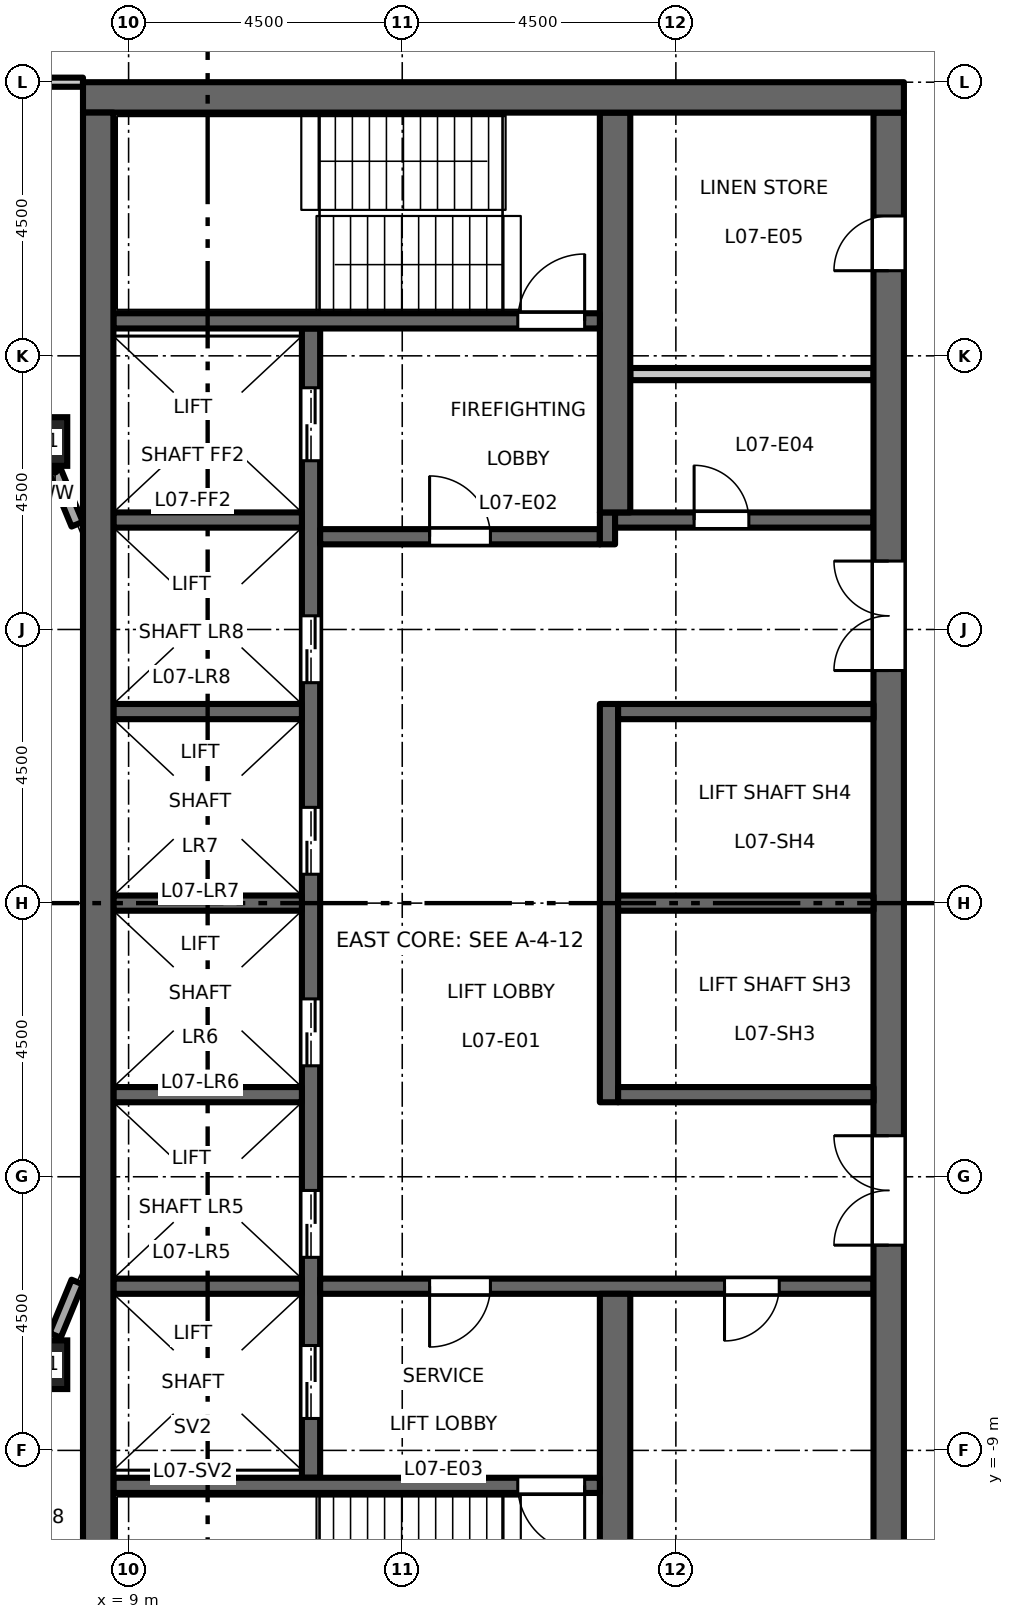
"""IFC4 building model, lengths in metres.
Left out: names, types, materials, properties, quantities, classifications, styles, units other than length and angle.
Written with IfcOpenShell. Run it as: python <this file> out.ifc"""

import sys

from ifc_helpers import new_model, si_unit, direction, frame, frame_2d, origin, origin_2d, place, context, subcontext, project, spatial, rectangle, hollow_rectangle, extrude, element, fill, save


model = new_model("IFC4")
c1 = context("Model", 3, precision=1e-05, world=origin(), true_north=direction((0.0, 1.0)))
c2 = subcontext(c1, "Body", "Model", "MODEL_VIEW")
j1 = project(units=[si_unit("LENGTHUNIT", "METRE"), si_unit("PLANEANGLEUNIT", "RADIAN")], contexts=[c1])
p1 = place(None, origin())
s1 = spatial("IfcSite", under=j1, at=p1, CompositionType="ELEMENT")
p2 = place(p1, origin())
s2 = spatial("IfcBuilding", under=s1, at=p2, CompositionType="ELEMENT")
p3 = place(p2, frame((0.0, 0.0, 35.7)))
s3 = spatial("IfcBuildingStorey", under=s2, at=p3, CompositionType="ELEMENT", Elevation=35.7)
for number, where, z_axis, x_axis in (
    (1, (7.591, -7.591, 0.0), (0.0, 0.0, 1.0), (1.0, 0.0, 0.0)),
    (2, (7.591, 7.591, 0.0), (0.0, 0.0, 1.0), (1.0, 0.0, 0.0)),
):
    element("IfcColumn", number, at=place(p3, frame(where, z_axis=z_axis, x_axis=x_axis)), inside=s3, PredefinedType="COLUMN", context=c2, shape_type="SweptSolid", body=[
        extrude(hollow_rectangle(XDim=0.8, YDim=0.8, WallThickness=0.05, at=origin_2d()), origin(), (0.0, 0.0, 1.0), 4.5),
    ])
p4 = place(p3, frame((12.0, -9.45, 0.0), z_axis=(0.0, 0.0, 1.0), x_axis=(0.0, 1.0, 0.0)))
e3 = element("IfcWall", 3, at=p4, inside=s3, PredefinedType="SHEAR", context=c2, shape_type="SweptSolid", body=[
    extrude(rectangle(XDim=18.9, YDim=0.3, at=frame_2d((9.45, 0.0))), origin(), (0.0, 0.0, 1.0), 4.35),
])
p5 = place(p4, frame((3.625, 0.0, 0.0)))
e4 = element("IfcOpeningElement", 4, at=p5, cuts=e3, PredefinedType="OPENING", context=c2, shape_type="SweptSolid", body=[
    extrude(rectangle(XDim=1.1, YDim=2.1, at=frame_2d((0.55, 1.05))), frame((0.0, 0.16, 0.0), z_axis=(0.0, -1.0, 0.0), x_axis=(1.0, 0.0, 0.0)), (0.0, 0.0, 1.0), 0.32),
])
p6 = place(p4, frame((6.775, 0.0, 0.0)))
e5 = element("IfcOpeningElement", 5, at=p6, cuts=e3, PredefinedType="OPENING", context=c2, shape_type="SweptSolid", body=[
    extrude(rectangle(XDim=1.1, YDim=2.1, at=frame_2d((0.55, 1.05))), frame((0.0, 0.16, 0.0), z_axis=(0.0, -1.0, 0.0), x_axis=(1.0, 0.0, 0.0)), (0.0, 0.0, 1.0), 0.32),
])
p7 = place(p4, frame((9.925, 0.0, 0.0)))
e6 = element("IfcOpeningElement", 6, at=p7, cuts=e3, PredefinedType="OPENING", context=c2, shape_type="SweptSolid", body=[
    extrude(rectangle(XDim=1.1, YDim=2.1, at=frame_2d((0.55, 1.05))), frame((0.0, 0.16, 0.0), z_axis=(0.0, -1.0, 0.0), x_axis=(1.0, 0.0, 0.0)), (0.0, 0.0, 1.0), 0.32),
])
p8 = place(p4, frame((13.075, 0.0, 0.0)))
e7 = element("IfcOpeningElement", 7, at=p8, cuts=e3, PredefinedType="OPENING", context=c2, shape_type="SweptSolid", body=[
    extrude(rectangle(XDim=1.1, YDim=2.1, at=frame_2d((0.55, 1.05))), frame((0.0, 0.16, 0.0), z_axis=(0.0, -1.0, 0.0), x_axis=(1.0, 0.0, 0.0)), (0.0, 0.0, 1.0), 0.32),
])
p9 = place(p4, frame((16.725, 0.0, 0.0)))
e8 = element("IfcOpeningElement", 8, at=p9, cuts=e3, PredefinedType="OPENING", context=c2, shape_type="SweptSolid", body=[
    extrude(rectangle(XDim=1.2, YDim=2.1, at=frame_2d((0.6, 1.05))), frame((0.0, 0.16, 0.0), z_axis=(0.0, -1.0, 0.0), x_axis=(1.0, 0.0, 0.0)), (0.0, 0.0, 1.0), 0.32),
])
p10 = place(p4, frame((0.975, 0.0, 0.0)))
e9 = element("IfcOpeningElement", 9, at=p10, cuts=e3, PredefinedType="OPENING", context=c2, shape_type="SweptSolid", body=[
    extrude(rectangle(XDim=1.2, YDim=2.1, at=frame_2d((0.6, 1.05))), frame((0.0, 0.16, 0.0), z_axis=(0.0, -1.0, 0.0), x_axis=(1.0, 0.0, 0.0)), (0.0, 0.0, 1.0), 0.32),
])
p11 = place(p3, frame((12.15, 6.025, 0.0), z_axis=(0.0, 0.0, 1.0), x_axis=(1.0, 0.0, 0.0)))
e10 = element("IfcWall", 10, at=p11, inside=s3, PredefinedType="SHEAR", context=c2, shape_type="SweptSolid", body=[
    extrude(rectangle(XDim=4.6, YDim=0.25, at=frame_2d((2.3, 0.0))), origin(), (0.0, 0.0, 1.0), 4.35),
])
p12 = place(p11, frame((1.8, 0.0, 0.0)))
e11 = element("IfcOpeningElement", 11, at=p12, cuts=e10, PredefinedType="OPENING", context=c2, shape_type="SweptSolid", body=[
    extrude(rectangle(XDim=1.0, YDim=2.1, at=frame_2d((0.5, 1.05))), frame((0.0, 0.135, 0.0), z_axis=(0.0, -1.0, 0.0), x_axis=(1.0, 0.0, 0.0)), (0.0, 0.0, 1.0), 0.27),
])
p13 = place(p3, frame((16.875, 5.9, 0.0), z_axis=(0.0, 0.0, 1.0), x_axis=(0.0, 1.0, 0.0)))
e12 = element("IfcWall", 12, at=p13, inside=s3, PredefinedType="SHEAR", context=c2, shape_type="SweptSolid", body=[
    extrude(rectangle(XDim=0.525, YDim=0.25, at=frame_2d((0.263, 0.0))), origin(), (0.0, 0.0, 1.0), 4.35),
])
p14 = place(p3, frame((17.0, 6.3, 0.0), z_axis=(0.0, 0.0, 1.0), x_axis=(1.0, 0.0, 0.0)))
e13 = element("IfcWall", 13, at=p14, inside=s3, PredefinedType="SHEAR", context=c2, shape_type="SweptSolid", body=[
    extrude(rectangle(XDim=4.25, YDim=0.25, at=frame_2d((2.125, 0.0))), origin(), (0.0, 0.0, 1.0), 4.35),
])
p15 = place(p14, frame((1.3, 0.0, 0.0)))
e14 = element("IfcOpeningElement", 14, at=p15, cuts=e13, PredefinedType="OPENING", context=c2, shape_type="SweptSolid", body=[
    extrude(rectangle(XDim=0.9, YDim=2.1, at=frame_2d((0.45, 1.05))), frame((0.0, 0.135, 0.0), z_axis=(0.0, -1.0, 0.0), x_axis=(1.0, 0.0, 0.0)), (0.0, 0.0, 1.0), 0.27),
])
p16 = place(p3, frame((12.15, -6.3, 0.0), z_axis=(0.0, 0.0, 1.0), x_axis=(1.0, 0.0, 0.0)))
e15 = element("IfcWall", 15, at=p16, inside=s3, PredefinedType="SHEAR", context=c2, shape_type="SweptSolid", body=[
    extrude(rectangle(XDim=9.1, YDim=0.25, at=frame_2d((4.55, 0.0))), origin(), (0.0, 0.0, 1.0), 4.35),
])
p17 = place(p16, frame((1.8, 0.0, 0.0)))
e16 = element("IfcOpeningElement", 16, at=p17, cuts=e15, PredefinedType="OPENING", context=c2, shape_type="SweptSolid", body=[
    extrude(rectangle(XDim=1.0, YDim=2.1, at=frame_2d((0.5, 1.05))), frame((0.0, 0.135, 0.0), z_axis=(0.0, -1.0, 0.0), x_axis=(1.0, 0.0, 0.0)), (0.0, 0.0, 1.0), 0.27),
])
p18 = place(p16, frame((6.65, 0.0, 0.0)))
e17 = element("IfcOpeningElement", 17, at=p18, cuts=e15, PredefinedType="OPENING", context=c2, shape_type="SweptSolid", body=[
    extrude(rectangle(XDim=0.9, YDim=2.1, at=frame_2d((0.45, 1.05))), frame((0.0, 0.135, 0.0), z_axis=(0.0, -1.0, 0.0), x_axis=(1.0, 0.0, 0.0)), (0.0, 0.0, 1.0), 0.27),
])
p19 = place(p3, frame((21.5, -13.0, 0.0), z_axis=(0.0, 0.0, 1.0), x_axis=(0.0, 1.0, 0.0)))
e18 = element("IfcWall", 18, at=p19, inside=s3, PredefinedType="SHEAR", context=c2, shape_type="SweptSolid", body=[
    extrude(rectangle(XDim=26.0, YDim=0.5, at=frame_2d((13.0, 0.0))), origin(), (0.0, 0.0, 1.0), 4.35),
])
p20 = place(p19, frame((16.825, 0.0, 0.0)))
e19 = element("IfcOpeningElement", 19, at=p20, cuts=e18, PredefinedType="OPENING", context=c2, shape_type="SweptSolid", body=[
    extrude(rectangle(XDim=1.8, YDim=2.1, at=frame_2d((0.9, 1.05))), frame((0.0, 0.26, 0.0), z_axis=(0.0, -1.0, 0.0), x_axis=(1.0, 0.0, 0.0)), (0.0, 0.0, 1.0), 0.52),
])
p21 = place(p19, frame((7.375, 0.0, 0.0)))
e20 = element("IfcOpeningElement", 20, at=p21, cuts=e18, PredefinedType="OPENING", context=c2, shape_type="SweptSolid", body=[
    extrude(rectangle(XDim=1.8, YDim=2.1, at=frame_2d((0.9, 1.05))), frame((0.0, 0.26, 0.0), z_axis=(0.0, -1.0, 0.0), x_axis=(1.0, 0.0, 0.0)), (0.0, 0.0, 1.0), 0.52),
])
p22 = place(p19, frame((23.4, 0.0, 0.0)))
e21 = element("IfcOpeningElement", 21, at=p22, cuts=e18, PredefinedType="OPENING", context=c2, shape_type="SweptSolid", body=[
    extrude(rectangle(XDim=0.9, YDim=2.1, at=frame_2d((0.45, 1.05))), frame((0.0, 0.26, 0.0), z_axis=(0.0, -1.0, 0.0), x_axis=(1.0, 0.0, 0.0)), (0.0, 0.0, 1.0), 0.52),
])
p23 = place(p3, frame((17.25, 8.7, 0.0), z_axis=(0.0, 0.0, 1.0), x_axis=(1.0, 0.0, 0.0)))
e22 = element("IfcWall", 22, at=p23, inside=s3, PredefinedType="PARTITIONING", context=c2, shape_type="SweptSolid", body=[
    extrude(rectangle(XDim=4.0, YDim=0.2, at=frame_2d((2.0, 0.0))), origin(), (0.0, 0.0, 1.0), 4.35),
])
p24 = place(p3, frame((16.9, -3.275, 0.0), z_axis=(0.0, 0.0, 1.0), x_axis=(0.0, 1.0, 0.0)))
e23 = element("IfcWall", 23, at=p24, inside=s3, PredefinedType="SHEAR", context=c2, shape_type="SweptSolid", body=[
    extrude(rectangle(XDim=6.55, YDim=0.3, at=frame_2d((3.275, 0.0))), origin(), (0.0, 0.0, 1.0), 4.35),
])
for number, where, z_axis, x_axis in (
    (24, (17.05, 0.0, 0.0), (0.0, 0.0, 1.0), (1.0, 0.0, 0.0)),
    (25, (17.05, 3.15, 0.0), (0.0, 0.0, 1.0), (1.0, 0.0, 0.0)),
    (26, (17.05, -3.15, 0.0), (0.0, 0.0, 1.0), (1.0, 0.0, 0.0)),
):
    element("IfcWall", number, at=place(p3, frame(where, z_axis=z_axis, x_axis=x_axis)), inside=s3, PredefinedType="SHEAR", context=c2, shape_type="SweptSolid", body=[
        extrude(rectangle(XDim=4.2, YDim=0.25, at=frame_2d((2.1, 0.0))), origin(), (0.0, 0.0, 1.0), 4.35),
    ])
for number, where, z_axis, x_axis in (
    (27, (17.0, 6.425, 0.0), (0.0, 0.0, 1.0), (0.0, 1.0, 0.0)),
    (28, (17.0, -13.0, 0.0), (0.0, 0.0, 1.0), (0.0, 1.0, 0.0)),
):
    element("IfcWall", number, at=place(p3, frame(where, z_axis=z_axis, x_axis=x_axis)), inside=s3, PredefinedType="SHEAR", context=c2, shape_type="SweptSolid", body=[
        extrude(rectangle(XDim=6.575, YDim=0.5, at=frame_2d((3.288, 0.0))), origin(), (0.0, 0.0, 1.0), 4.35),
    ])
for number, where, z_axis, x_axis in (
    (29, (8.75, 0.0, 0.0), (0.0, 0.0, 1.0), (1.0, 0.0, 0.0)),
    (30, (8.75, 3.15, 0.0), (0.0, 0.0, 1.0), (1.0, 0.0, 0.0)),
    (31, (8.75, 6.3, 0.0), (0.0, 0.0, 1.0), (1.0, 0.0, 0.0)),
    (32, (8.75, -3.15, 0.0), (0.0, 0.0, 1.0), (1.0, 0.0, 0.0)),
    (33, (8.75, -6.3, 0.0), (0.0, 0.0, 1.0), (1.0, 0.0, 0.0)),
):
    element("IfcWall", number, at=place(p3, frame(where, z_axis=z_axis, x_axis=x_axis)), inside=s3, PredefinedType="SHEAR", context=c2, shape_type="SweptSolid", body=[
        extrude(rectangle(XDim=3.1, YDim=0.25, at=frame_2d((1.55, 0.0))), origin(), (0.0, 0.0, 1.0), 4.35),
    ])
p25 = place(p3, frame((8.75, 9.575, 0.0), z_axis=(0.0, 0.0, 1.0), x_axis=(1.0, 0.0, 0.0)))
e34 = element("IfcWall", 34, at=p25, inside=s3, PredefinedType="SHEAR", context=c2, shape_type="SweptSolid", body=[
    extrude(rectangle(XDim=8.0, YDim=0.25, at=frame_2d((4.0, 0.0))), origin(), (0.0, 0.0, 1.0), 4.35),
])
p26 = place(p25, frame((6.65, 0.0, 0.0)))
e35 = element("IfcOpeningElement", 35, at=p26, cuts=e34, PredefinedType="OPENING", context=c2, shape_type="SweptSolid", body=[
    extrude(rectangle(XDim=1.1, YDim=2.1, at=frame_2d((0.55, 1.05))), frame((0.0, 0.135, 0.0), z_axis=(0.0, -1.0, 0.0), x_axis=(1.0, 0.0, 0.0)), (0.0, 0.0, 1.0), 0.27),
])
p27 = place(p3, frame((8.75, -9.575, 0.0), z_axis=(0.0, 0.0, 1.0), x_axis=(1.0, 0.0, 0.0)))
e36 = element("IfcWall", 36, at=p27, inside=s3, PredefinedType="SHEAR", context=c2, shape_type="SweptSolid", body=[
    extrude(rectangle(XDim=8.0, YDim=0.25, at=frame_2d((4.0, 0.0))), origin(), (0.0, 0.0, 1.0), 4.35),
])
p28 = place(p27, frame((6.65, 0.0, 0.0)))
e37 = element("IfcOpeningElement", 37, at=p28, cuts=e36, PredefinedType="OPENING", context=c2, shape_type="SweptSolid", body=[
    extrude(rectangle(XDim=1.1, YDim=2.1, at=frame_2d((0.55, 1.05))), frame((0.0, 0.135, 0.0), z_axis=(0.0, -1.0, 0.0), x_axis=(1.0, 0.0, 0.0)), (0.0, 0.0, 1.0), 0.27),
])
p29 = place(p3, frame((8.25, 13.25, 0.0), z_axis=(0.0, 0.0, 1.0), x_axis=(1.0, 0.0, 0.0)))
e38 = element("IfcWall", 38, at=p29, inside=s3, PredefinedType="SHEAR", context=c2, shape_type="SweptSolid", body=[
    extrude(rectangle(XDim=13.5, YDim=0.5, at=frame_2d((6.75, 0.0))), origin(), (0.0, 0.0, 1.0), 4.35),
])
p30 = place(p3, frame((8.5, -13.0, 0.0), z_axis=(0.0, 0.0, 1.0), x_axis=(0.0, 1.0, 0.0)))
e39 = element("IfcWall", 39, at=p30, inside=s3, PredefinedType="SHEAR", context=c2, shape_type="SweptSolid", body=[
    extrude(rectangle(XDim=26.0, YDim=0.5, at=frame_2d((13.0, 0.0))), origin(), (0.0, 0.0, 1.0), 4.35),
])
for number, where, z_axis, x_axis in (
    (40, (7.791, -7.108, 0.0), (0.0, 0.0, 1.0), (0.383, 0.924, 0.0)),
    (41, (8.154, 6.231, 0.0), (0.0, 0.0, 1.0), (-0.383, 0.924, 0.0)),
):
    element("IfcWall", number, at=place(p3, frame(where, z_axis=z_axis, x_axis=x_axis)), inside=s3, PredefinedType="STANDARD", context=c2, shape_type="SweptSolid", body=[
        extrude(rectangle(XDim=0.949, YDim=0.2, at=frame_2d((0.475, 0.0))), origin(), (0.0, 0.0, 1.0), 3.73),
    ])
p31 = place(p3, frame((-8.25, 13.5, 0.0), z_axis=(0.0, 0.0, 1.0), x_axis=(1.0, 0.0, 0.0)))
e42 = element("IfcWall", 42, at=p31, inside=s3, PredefinedType="PARTITIONING", context=c2, shape_type="SweptSolid", body=[
    extrude(rectangle(XDim=16.5, YDim=0.15, at=frame_2d((8.25, 0.0))), origin(), (0.0, 0.0, 1.0), 3.85),
])
p32 = place(p31, frame((1.4, 0.0, 0.0)))
e43 = element("IfcOpeningElement", 43, at=p32, cuts=e42, PredefinedType="OPENING", context=c2, shape_type="SweptSolid", body=[
    extrude(rectangle(XDim=1.0, YDim=2.1, at=frame_2d((0.5, 1.05))), frame((0.0, 0.085, 0.0), z_axis=(0.0, -1.0, 0.0), x_axis=(1.0, 0.0, 0.0)), (0.0, 0.0, 1.0), 0.17),
])
p33 = place(p31, frame((9.65, 0.0, 0.0)))
e44 = element("IfcOpeningElement", 44, at=p33, cuts=e42, PredefinedType="OPENING", context=c2, shape_type="SweptSolid", body=[
    extrude(rectangle(XDim=1.0, YDim=2.1, at=frame_2d((0.5, 1.05))), frame((0.0, 0.085, 0.0), z_axis=(0.0, -1.0, 0.0), x_axis=(1.0, 0.0, 0.0)), (0.0, 0.0, 1.0), 0.17),
])
p34 = place(p12, origin())
e45 = element("IfcDoor", 45, at=p34, inside=s3, OperationType="SINGLE_SWING_RIGHT", PredefinedType="DOOR", context=c2, shape_type="SweptSolid", body=[
    extrude(rectangle(XDim=1.0, YDim=2.1, at=frame_2d((0.5, 1.05))), frame((0.0, 0.025, 0.0), z_axis=(0.0, -1.0, 0.0), x_axis=(1.0, 0.0, 0.0)), (0.0, 0.0, 1.0), 0.05),
])
fill(e11, e45)
p35 = place(p17, origin())
e46 = element("IfcDoor", 46, at=p35, inside=s3, OperationType="SINGLE_SWING_LEFT", PredefinedType="DOOR", context=c2, shape_type="SweptSolid", body=[
    extrude(rectangle(XDim=1.0, YDim=2.1, at=frame_2d((0.5, 1.05))), frame((0.0, 0.025, 0.0), z_axis=(0.0, -1.0, 0.0), x_axis=(1.0, 0.0, 0.0)), (0.0, 0.0, 1.0), 0.05),
])
fill(e16, e46)
p36 = place(p26, origin())
e47 = element("IfcDoor", 47, at=p36, inside=s3, OperationType="SINGLE_SWING_LEFT", PredefinedType="DOOR", context=c2, shape_type="SweptSolid", body=[
    extrude(rectangle(XDim=1.1, YDim=2.1, at=frame_2d((0.55, 1.05))), frame((0.0, 0.025, 0.0), z_axis=(0.0, -1.0, 0.0), x_axis=(1.0, 0.0, 0.0)), (0.0, 0.0, 1.0), 0.05),
])
fill(e35, e47)
p37 = place(p28, origin())
e48 = element("IfcDoor", 48, at=p37, inside=s3, OperationType="SINGLE_SWING_RIGHT", PredefinedType="DOOR", context=c2, shape_type="SweptSolid", body=[
    extrude(rectangle(XDim=1.1, YDim=2.1, at=frame_2d((0.55, 1.05))), frame((0.0, 0.025, 0.0), z_axis=(0.0, -1.0, 0.0), x_axis=(1.0, 0.0, 0.0)), (0.0, 0.0, 1.0), 0.05),
])
fill(e37, e48)
p38 = place(p20, origin())
e49 = element("IfcDoor", 49, at=p38, inside=s3, OperationType="DOUBLE_DOOR_DOUBLE_SWING", PredefinedType="DOOR", context=c2, shape_type="SweptSolid", body=[
    extrude(rectangle(XDim=1.8, YDim=2.1, at=frame_2d((0.9, 1.05))), frame((0.0, 0.025, 0.0), z_axis=(0.0, -1.0, 0.0), x_axis=(1.0, 0.0, 0.0)), (0.0, 0.0, 1.0), 0.05),
])
fill(e19, e49)
p39 = place(p21, origin())
e50 = element("IfcDoor", 50, at=p39, inside=s3, OperationType="DOUBLE_DOOR_DOUBLE_SWING", PredefinedType="DOOR", context=c2, shape_type="SweptSolid", body=[
    extrude(rectangle(XDim=1.8, YDim=2.1, at=frame_2d((0.9, 1.05))), frame((0.0, 0.025, 0.0), z_axis=(0.0, -1.0, 0.0), x_axis=(1.0, 0.0, 0.0)), (0.0, 0.0, 1.0), 0.05),
])
fill(e20, e50)
p40 = place(p5, origin())
e51 = element("IfcDoor", 51, at=p40, inside=s3, OperationType="DOUBLE_DOOR_SLIDING", PredefinedType="DOOR", context=c2, shape_type="SweptSolid", body=[
    extrude(rectangle(XDim=1.1, YDim=2.1, at=frame_2d((0.55, 1.05))), frame((0.0, 0.025, 0.0), z_axis=(0.0, -1.0, 0.0), x_axis=(1.0, 0.0, 0.0)), (0.0, 0.0, 1.0), 0.05),
])
fill(e4, e51)
p41 = place(p6, origin())
e52 = element("IfcDoor", 52, at=p41, inside=s3, OperationType="DOUBLE_DOOR_SLIDING", PredefinedType="DOOR", context=c2, shape_type="SweptSolid", body=[
    extrude(rectangle(XDim=1.1, YDim=2.1, at=frame_2d((0.55, 1.05))), frame((0.0, 0.025, 0.0), z_axis=(0.0, -1.0, 0.0), x_axis=(1.0, 0.0, 0.0)), (0.0, 0.0, 1.0), 0.05),
])
fill(e5, e52)
p42 = place(p7, origin())
e53 = element("IfcDoor", 53, at=p42, inside=s3, OperationType="DOUBLE_DOOR_SLIDING", PredefinedType="DOOR", context=c2, shape_type="SweptSolid", body=[
    extrude(rectangle(XDim=1.1, YDim=2.1, at=frame_2d((0.55, 1.05))), frame((0.0, 0.025, 0.0), z_axis=(0.0, -1.0, 0.0), x_axis=(1.0, 0.0, 0.0)), (0.0, 0.0, 1.0), 0.05),
])
fill(e6, e53)
p43 = place(p8, origin())
e54 = element("IfcDoor", 54, at=p43, inside=s3, OperationType="DOUBLE_DOOR_SLIDING", PredefinedType="DOOR", context=c2, shape_type="SweptSolid", body=[
    extrude(rectangle(XDim=1.1, YDim=2.1, at=frame_2d((0.55, 1.05))), frame((0.0, 0.025, 0.0), z_axis=(0.0, -1.0, 0.0), x_axis=(1.0, 0.0, 0.0)), (0.0, 0.0, 1.0), 0.05),
])
fill(e7, e54)
p44 = place(p9, origin())
e55 = element("IfcDoor", 55, at=p44, inside=s3, OperationType="DOUBLE_DOOR_SLIDING", PredefinedType="DOOR", context=c2, shape_type="SweptSolid", body=[
    extrude(rectangle(XDim=1.2, YDim=2.1, at=frame_2d((0.6, 1.05))), frame((0.0, 0.025, 0.0), z_axis=(0.0, -1.0, 0.0), x_axis=(1.0, 0.0, 0.0)), (0.0, 0.0, 1.0), 0.05),
])
fill(e8, e55)
p45 = place(p10, origin())
e56 = element("IfcDoor", 56, at=p45, inside=s3, OperationType="DOUBLE_DOOR_SLIDING", PredefinedType="DOOR", context=c2, shape_type="SweptSolid", body=[
    extrude(rectangle(XDim=1.2, YDim=2.1, at=frame_2d((0.6, 1.05))), frame((0.0, 0.025, 0.0), z_axis=(0.0, -1.0, 0.0), x_axis=(1.0, 0.0, 0.0)), (0.0, 0.0, 1.0), 0.05),
])
fill(e9, e56)
p46 = place(p15, origin())
e57 = element("IfcDoor", 57, at=p46, inside=s3, OperationType="SINGLE_SWING_RIGHT", PredefinedType="DOOR", context=c2, shape_type="SweptSolid", body=[
    extrude(rectangle(XDim=0.9, YDim=2.1, at=frame_2d((0.45, 1.05))), frame((0.0, 0.025, 0.0), z_axis=(0.0, -1.0, 0.0), x_axis=(1.0, 0.0, 0.0)), (0.0, 0.0, 1.0), 0.05),
])
fill(e14, e57)
p47 = place(p22, origin())
e58 = element("IfcDoor", 58, at=p47, inside=s3, OperationType="SINGLE_SWING_RIGHT", PredefinedType="DOOR", context=c2, shape_type="SweptSolid", body=[
    extrude(rectangle(XDim=0.9, YDim=2.1, at=frame_2d((0.45, 1.05))), frame((0.0, 0.025, 0.0), z_axis=(0.0, -1.0, 0.0), x_axis=(1.0, 0.0, 0.0)), (0.0, 0.0, 1.0), 0.05),
])
fill(e21, e58)
p48 = place(p18, origin())
e59 = element("IfcDoor", 59, at=p48, inside=s3, OperationType="SINGLE_SWING_LEFT", PredefinedType="DOOR", context=c2, shape_type="SweptSolid", body=[
    extrude(rectangle(XDim=0.9, YDim=2.1, at=frame_2d((0.45, 1.05))), frame((0.0, 0.025, 0.0), z_axis=(0.0, -1.0, 0.0), x_axis=(1.0, 0.0, 0.0)), (0.0, 0.0, 1.0), 0.05),
])
fill(e17, e59)
save(model, sys.argv[1])
